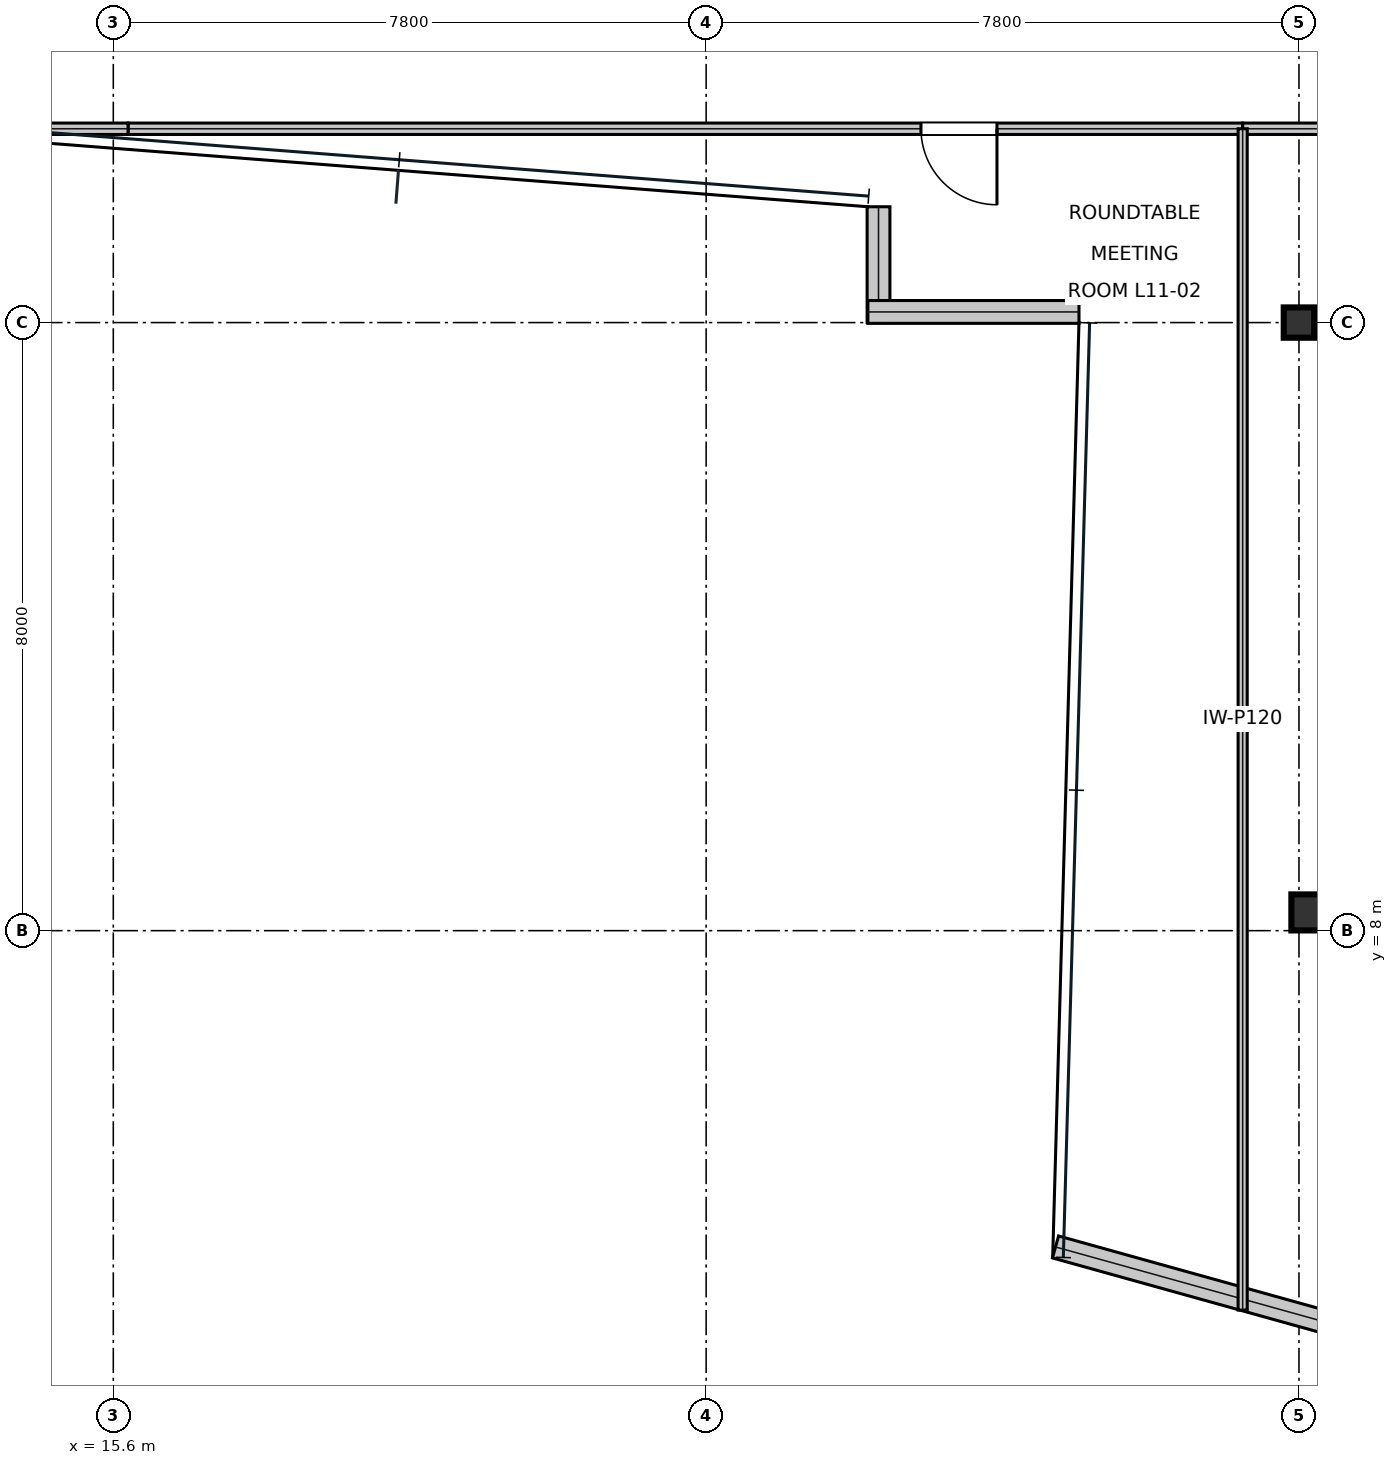
"""IFC4 building model, lengths in metres.
Left out: names, types, materials, properties, quantities, classifications, styles, units other than length and angle.
Written with IfcOpenShell. Run it as: python <this file> out.ifc"""

import sys

from ifc_helpers import new_model, si_unit, direction, frame, frame_2d, origin, origin_2d, place, context, subcontext, project, spatial, rectangle, i_section, extrude, element, fill, save


model = new_model("IFC4")
c1 = context("Model", 3, precision=1e-05, world=origin(), true_north=direction((0.0, 1.0)))
c2 = subcontext(c1, "Body", "Model", "MODEL_VIEW")
j1 = project(units=[si_unit("LENGTHUNIT", "METRE"), si_unit("PLANEANGLEUNIT", "RADIAN")], contexts=[c1])
p1 = place(None, origin())
s1 = spatial("IfcSite", under=j1, at=p1, CompositionType="ELEMENT")
p2 = place(p1, origin())
s2 = spatial("IfcBuilding", under=s1, at=p2, CompositionType="ELEMENT")
p3 = place(p2, frame((0.0, 0.0, 54.0)))
s3 = spatial("IfcBuildingStorey", under=s2, at=p3, CompositionType="ELEMENT", Elevation=54.0)
p4 = place(p3, frame((31.2, 16.0, 0.0), z_axis=(0.0, 0.0, 1.0), x_axis=(1.0, 0.0, 0.0)))
e1 = element("IfcColumn", 1, at=p4, inside=s3, PredefinedType="COLUMN", context=c2, shape_type="SweptSolid", body=[
    extrude(i_section(OverallWidth=0.401, OverallDepth=0.399, WebThickness=0.025, FlangeThickness=0.04, at=origin_2d()), origin(), (0.0, 0.0, 1.0), 4.044),
])
p5 = place(p3, frame((31.312, 8.24, 0.016), z_axis=(0.0, 0.0, 1.0), x_axis=(1.0, 0.0, 0.0)))
e2 = element("IfcColumn", 2, at=p5, inside=s3, PredefinedType="COLUMN", context=c2, shape_type="SweptSolid", body=[
    extrude(i_section(OverallWidth=0.424, OverallDepth=0.474, WebThickness=0.048, FlangeThickness=0.077, at=origin_2d()), origin(), (0.0, 0.0, 1.0), 4.018),
])
p6 = place(p3, frame((25.668, 17.524, 0.0), z_axis=(0.0, 0.0, 1.0), x_axis=(0.0, -1.0, 0.0)))
e3 = element("IfcWall", 3, at=p6, inside=s3, PredefinedType="STANDARD", context=c2, shape_type="SweptSolid", body=[
    extrude(rectangle(XDim=1.524, YDim=0.3, at=frame_2d((0.762, 0.0))), origin(), (0.0, 0.0, 1.0), 3.338),
])
p7 = place(p3, frame((25.528, 16.14, 0.0), z_axis=(0.0, 0.0, 1.0), x_axis=(1.0, 0.0, 0.0)))
e4 = element("IfcWall", 4, at=p7, inside=s3, PredefinedType="STANDARD", context=c2, shape_type="SweptSolid", body=[
    extrude(rectangle(XDim=2.777, YDim=0.3, at=frame_2d((1.389, 0.0))), origin(), (0.0, 0.0, 1.0), 3.81),
])
p8 = place(p3, frame((27.997, 3.839, 0.0), z_axis=(0.0, 0.0, 1.0), x_axis=(0.963365312104, -0.268192608836, 0.0)))
e5 = element("IfcWall", 5, at=p8, inside=s3, PredefinedType="STANDARD", context=c2, shape_type="SweptSolid", body=[
    extrude(rectangle(XDim=7.159, YDim=0.3, at=frame_2d((3.579, 0.0))), origin(), (0.0, 0.0, 1.0), 3.81),
])
p9 = place(p3, frame((15.794, 18.55, 0.0), z_axis=(0.0, 0.0, 1.0), x_axis=(1.0, 0.0, 0.0)))
e6 = element("IfcWall", 6, at=p9, inside=s3, PredefinedType="PARTITIONING", context=c2, shape_type="SweptSolid", body=[
    extrude(rectangle(XDim=14.665, YDim=0.15, at=frame_2d((7.333, 0.0))), origin(), (0.0, 0.0, 1.0), 3.338),
])
p10 = place(p9, frame((10.433, 0.0, 0.0)))
e7 = element("IfcOpeningElement", 7, at=p10, cuts=e6, PredefinedType="OPENING", context=c2, shape_type="SweptSolid", body=[
    extrude(rectangle(XDim=1.0, YDim=2.15, at=frame_2d((0.5, 1.075))), frame((0.0, 0.085, 0.0), z_axis=(0.0, -1.0, 0.0), x_axis=(1.0, 0.0, 0.0)), (0.0, 0.0, 1.0), 0.17),
])
p11 = place(p3, frame((30.459, 18.55, 0.0), z_axis=(0.0, 0.0, 1.0), x_axis=(1.0, 0.0, 0.0)))
e8 = element("IfcWall", 8, at=p11, inside=s3, PredefinedType="PARTITIONING", context=c2, shape_type="SweptSolid", body=[
    extrude(rectangle(XDim=2.941, YDim=0.15, at=frame_2d((1.47, 0.0))), origin(), (0.0, 0.0, 1.0), 3.181),
])
p12 = place(p3, frame((14.0, 18.55, 0.0), z_axis=(0.0, 0.0, 1.0), x_axis=(1.0, 0.0, 0.0)))
e9 = element("IfcWall", 9, at=p12, inside=s3, PredefinedType="PARTITIONING", context=c2, shape_type="SweptSolid", body=[
    extrude(rectangle(XDim=1.794, YDim=0.15, at=frame_2d((0.897, 0.0))), origin(), (0.0, 0.0, 1.0), 3.81),
])
p13 = place(p3, frame((30.459, 3.008, 0.0), z_axis=(0.0, 0.0, 1.0), x_axis=(0.0, 1.0, 0.0)))
e10 = element("IfcWall", 10, at=p13, inside=s3, PredefinedType="PARTITIONING", context=c2, shape_type="SweptSolid", body=[
    extrude(rectangle(XDim=15.542, YDim=0.12, at=frame_2d((7.771, 0.0))), origin(), (0.0, 0.0, 1.0), 3.338),
])
p14 = place(p10, frame((1.0, 0.0, 0.0), z_axis=(0.0, 0.0, 1.0), x_axis=(-1.0, 0.0, 0.0)))
e11 = element("IfcDoor", 11, at=p14, inside=s3, OperationType="SINGLE_SWING_LEFT", PredefinedType="DOOR", context=c2, shape_type="SweptSolid", body=[
    extrude(rectangle(XDim=1.0, YDim=2.15, at=frame_2d((0.5, 1.075))), frame((0.0, 0.025, 0.0), z_axis=(0.0, -1.0, 0.0), x_axis=(1.0, 0.0, 0.0)), (0.0, 0.0, 1.0), 0.05),
])
fill(e7, e11)
save(model, sys.argv[1])
